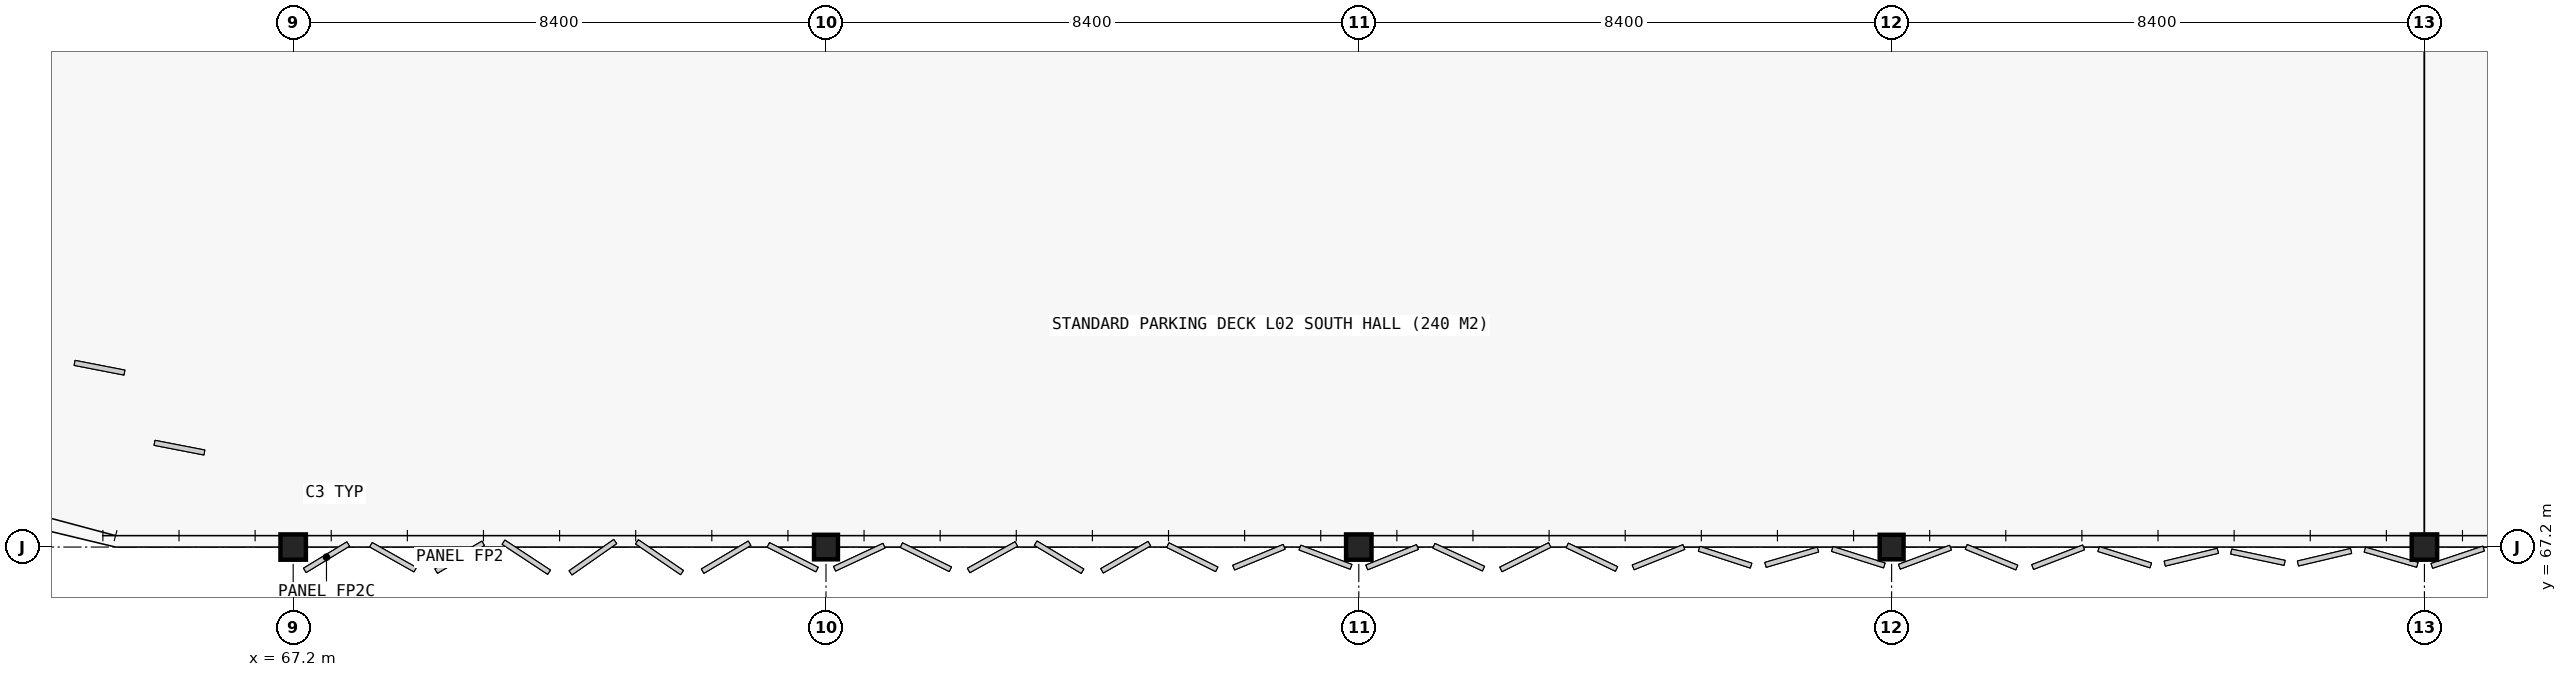
"""IFC4 building model, lengths in metres.
Left out: names, types, materials, properties, quantities, classifications, styles, units other than length and angle.
Written with IfcOpenShell. Run it as: python <this file> out.ifc"""

import sys

from ifc_helpers import new_model, si_unit, direction, frame, origin, origin_2d, place, context, subcontext, project, spatial, i_section, extrude, element, save


model = new_model("IFC4")
c1 = context("Model", 3, precision=1e-05, world=origin(), true_north=direction((0.0, 1.0)))
c2 = subcontext(c1, "Body", "Model", "MODEL_VIEW")
j1 = project(units=[si_unit("LENGTHUNIT", "METRE"), si_unit("PLANEANGLEUNIT", "RADIAN")], contexts=[c1])
p1 = place(None, origin())
s1 = spatial("IfcSite", under=j1, at=p1, CompositionType="ELEMENT")
p2 = place(p1, origin())
s2 = spatial("IfcBuilding", under=s1, at=p2, CompositionType="ELEMENT")
p3 = place(p2, frame((0.0, 0.0, 9.0)))
s3 = spatial("IfcBuildingStorey", under=s2, at=p3, CompositionType="ELEMENT", Elevation=9.0)
p4 = place(p3, frame((67.2, 67.2, 0.0), z_axis=(0.0, 0.0, 1.0), x_axis=(1.0, 0.0, 0.0)))
e1 = element("IfcColumn", 1, at=p4, inside=s3, PredefinedType="COLUMN", context=c2, shape_type="SweptSolid", body=[
    extrude(i_section(OverallWidth=0.401, OverallDepth=0.399, WebThickness=0.025, FlangeThickness=0.04, FilletRadius=0.015, at=origin_2d()), origin(), (0.0, 0.0, 1.0), 4.2),
])
p5 = place(p3, frame((75.6, 67.2, 0.0), z_axis=(0.0, 0.0, 1.0), x_axis=(1.0, 0.0, 0.0)))
e2 = element("IfcColumn", 2, at=p5, inside=s3, PredefinedType="COLUMN", context=c2, shape_type="SweptSolid", body=[
    extrude(i_section(OverallWidth=0.377, OverallDepth=0.387, WebThickness=0.022, FlangeThickness=0.036, FilletRadius=0.015, at=origin_2d()), origin(), (0.0, 0.0, 1.0), 4.2),
])
p6 = place(p3, frame((84.0, 67.2, 0.0), z_axis=(0.0, 0.0, 1.0), x_axis=(1.0, 0.0, 0.0)))
e3 = element("IfcColumn", 3, at=p6, inside=s3, PredefinedType="COLUMN", context=c2, shape_type="SweptSolid", body=[
    extrude(i_section(OverallWidth=0.401, OverallDepth=0.399, WebThickness=0.025, FlangeThickness=0.04, FilletRadius=0.015, at=origin_2d()), origin(), (0.0, 0.0, 1.0), 4.2),
])
p7 = place(p3, frame((92.4, 67.2, 0.0), z_axis=(0.0, 0.0, 1.0), x_axis=(1.0, 0.0, 0.0)))
e4 = element("IfcColumn", 4, at=p7, inside=s3, PredefinedType="COLUMN", context=c2, shape_type="SweptSolid", body=[
    extrude(i_section(OverallWidth=0.377, OverallDepth=0.387, WebThickness=0.022, FlangeThickness=0.036, FilletRadius=0.015, at=origin_2d()), origin(), (0.0, 0.0, 1.0), 4.2),
])
p8 = place(p3, frame((100.8, 67.2, 0.0), z_axis=(0.0, 0.0, 1.0), x_axis=(1.0, 0.0, 0.0)))
e5 = element("IfcColumn", 5, at=p8, inside=s3, PredefinedType="COLUMN", context=c2, shape_type="SweptSolid", body=[
    extrude(i_section(OverallWidth=0.401, OverallDepth=0.399, WebThickness=0.025, FlangeThickness=0.04, FilletRadius=0.015, at=origin_2d()), origin(), (0.0, 0.0, 1.0), 4.2),
])
save(model, sys.argv[1])
